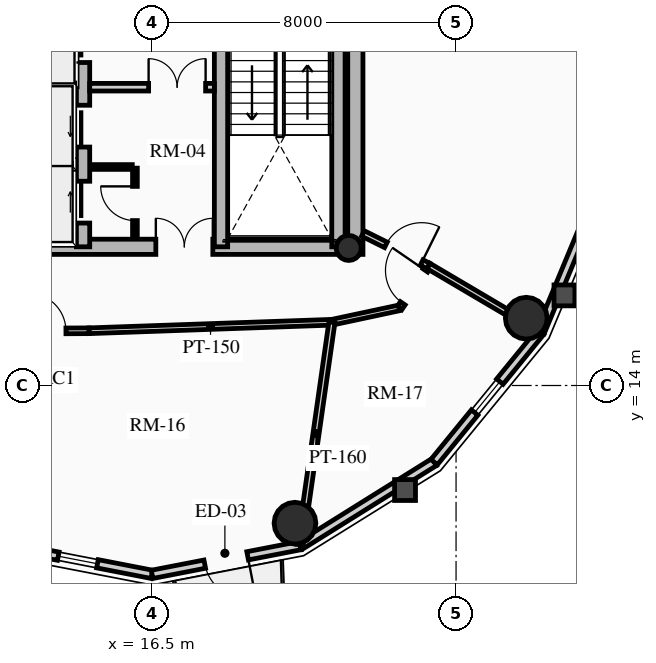
"""IFC4 building model, lengths in metres.
Left out: names, types, materials, properties, quantities, classifications, styles, units other than length and angle.
Written with IfcOpenShell. Run it as: python <this file> out.ifc"""

import sys

from ifc_helpers import new_model, si_unit, direction, frame, frame_2d, origin, origin_2d, place, context, subcontext, project, spatial, rectangle, circle, hollow_circle, extrude, source, transform, mapped, element, fill, save


model = new_model("IFC4")
c1 = context("Model", 3, precision=1e-05, world=origin(), true_north=direction((0.0, 1.0)))
c2 = subcontext(c1, "Body", "Model", "MODEL_VIEW")
j1 = project(units=[si_unit("LENGTHUNIT", "METRE"), si_unit("PLANEANGLEUNIT", "RADIAN")], contexts=[c1])
p1 = place(None, origin())
s1 = spatial("IfcSite", under=j1, at=p1, CompositionType="ELEMENT")
p2 = place(p1, origin())
s2 = spatial("IfcBuilding", under=s1, at=p2, CompositionType="ELEMENT")
p3 = place(p2, frame((0.0, 0.0, 217.03)))
s3 = spatial("IfcBuildingStorey", under=s2, at=p3, CompositionType="ELEMENT", Elevation=217.03)
p4 = place(p3, frame((21.85, 17.45, 0.0), z_axis=(0.0, 0.0, 1.0), x_axis=(0.0, 1.0, 0.0)))
e1 = element("IfcWall", 1, at=p4, inside=s3, PredefinedType="SHEAR", context=c2, shape_type="SweptSolid", body=[
    extrude(rectangle(XDim=14.1, YDim=0.4, at=frame_2d((7.05, 0.0))), origin(), (0.0, 0.0, 1.0), 2.91),
])
p5 = place(p3, frame((11.15, 17.65, 0.0), z_axis=(0.0, 0.0, 1.0), x_axis=(1.0, 0.0, 0.0)))
e2 = element("IfcWall", 2, at=p5, inside=s3, PredefinedType="SHEAR", context=c2, shape_type="SweptSolid", body=[
    extrude(rectangle(XDim=10.7, YDim=0.4, at=frame_2d((5.35, 0.0))), origin(), (0.0, 0.0, 1.0), 2.91),
])
m1 = source(origin(), c2, "Body", "SweptSolid", [
    extrude(rectangle(XDim=1.5, YDim=2.02, at=frame_2d((0.75, 1.01))), frame((0.0, 0.21, 0.0), z_axis=(0.0, -1.0, 0.0), x_axis=(1.0, 0.0, 0.0)), (0.0, 0.0, 1.0), 0.42),
])
p6 = place(p5, frame((5.45, 0.0, 0.0)))
e3 = element("IfcOpeningElement", 3, at=p6, cuts=e2, PredefinedType="OPENING", context=c2, shape_type="MappedRepresentation", body=[
    mapped(m1, transform((0.0, 0.0, 0.0), x_axis=(1.0, 0.0, 0.0), y_axis=(0.0, 1.0, 0.0), z_axis=(0.0, 0.0, 1.0), scale=1.0)),
])
p7 = place(p3, frame((14.685, 17.65, 0.0), z_axis=(0.0, 0.0, 1.0), x_axis=(0.0, 1.0, 0.0)))
e4 = element("IfcWall", 4, at=p7, inside=s3, PredefinedType="SHEAR", context=c2, shape_type="SweptSolid", body=[
    extrude(rectangle(XDim=13.7, YDim=0.35, at=frame_2d((6.85, 0.0))), origin(), (0.0, 0.0, 1.0), 2.91),
])
m2 = source(origin(), c2, "Body", "SweptSolid", [
    extrude(rectangle(XDim=1.1, YDim=2.015, at=frame_2d((0.55, 1.007))), frame((0.0, 0.185, 0.0), z_axis=(0.0, -1.0, 0.0), x_axis=(1.0, 0.0, 0.0)), (0.0, 0.0, 1.0), 0.37),
])
p8 = place(p7, frame((4.85, 0.0, 0.0)))
e5 = element("IfcOpeningElement", 5, at=p8, cuts=e4, PredefinedType="OPENING", context=c2, shape_type="MappedRepresentation", body=[
    mapped(m2, transform((0.0, 0.0, 0.0), x_axis=(1.0, 0.0, 0.0), y_axis=(0.0, 1.0, 0.0), z_axis=(0.0, 0.0, 1.0), scale=1.0)),
])
p9 = place(p7, frame((0.625, 0.0, 0.0)))
e6 = element("IfcOpeningElement", 6, at=p9, cuts=e4, PredefinedType="OPENING", context=c2, shape_type="MappedRepresentation", body=[
    mapped(m2, transform((0.0, 0.0, 0.0), x_axis=(1.0, 0.0, 0.0), y_axis=(0.0, 1.0, 0.0), z_axis=(0.0, 0.0, 1.0), scale=1.0)),
])
p10 = place(p7, frame((2.625, 0.0, 0.0)))
e7 = element("IfcOpeningElement", 7, at=p10, cuts=e4, PredefinedType="OPENING", context=c2, shape_type="MappedRepresentation", body=[
    mapped(m2, transform((0.0, 0.0, 0.0), x_axis=(1.0, 0.0, 0.0), y_axis=(0.0, 1.0, 0.0), z_axis=(0.0, 0.0, 1.0), scale=1.0)),
])
m3 = source(origin(), c2, "Body", "SweptSolid", [
    extrude(rectangle(XDim=1.15, YDim=2.02, at=frame_2d((0.575, 1.01))), frame((0.0, 0.185, 0.0), z_axis=(0.0, -1.0, 0.0), x_axis=(1.0, 0.0, 0.0)), (0.0, 0.0, 1.0), 0.37),
])
p11 = place(p7, frame((7.27, 0.0, 0.0)))
e8 = element("IfcOpeningElement", 8, at=p11, cuts=e4, PredefinedType="OPENING", context=c2, shape_type="MappedRepresentation", body=[
    mapped(m3, transform((0.0, 0.0, 0.0), x_axis=(1.0, 0.0, 0.0), y_axis=(0.0, 1.0, 0.0), z_axis=(0.0, 0.0, 1.0), scale=1.0)),
])
p12 = place(p3, frame((18.315, 17.65, 0.0), z_axis=(0.0, 0.0, 1.0), x_axis=(0.0, 1.0, 0.0)))
e9 = element("IfcWall", 9, at=p12, inside=s3, PredefinedType="SHEAR", context=c2, shape_type="SweptSolid", body=[
    extrude(rectangle(XDim=9.6, YDim=0.35, at=frame_2d((4.8, 0.0))), origin(), (0.0, 0.0, 1.0), 2.91),
])
p13 = place(p12, frame((5.28, 0.0, 0.0)))
e10 = element("IfcOpeningElement", 10, at=p13, cuts=e9, PredefinedType="OPENING", context=c2, shape_type="MappedRepresentation", body=[
    mapped(m3, transform((0.0, 0.0, 0.0), x_axis=(1.0, 0.0, 0.0), y_axis=(0.0, 1.0, 0.0), z_axis=(0.0, 0.0, 1.0), scale=1.0)),
])
p14 = place(p3, frame((21.405, 17.65, 0.0), z_axis=(0.0, 0.0, 1.0), x_axis=(0.0, 1.0, 0.0)))
e11 = element("IfcWall", 11, at=p14, inside=s3, PredefinedType="SHEAR", context=c2, shape_type="SweptSolid", body=[
    extrude(rectangle(XDim=6.695, YDim=0.35, at=frame_2d((3.348, 0.0))), origin(), (0.0, 0.0, 1.0), 2.91),
])
p15 = place(p3, frame((21.675, 17.62, 0.0), z_axis=(0.0, 0.0, 1.0), x_axis=(1.0, 0.0, 0.0)))
e12 = element("IfcColumn", 12, at=p15, inside=s3, PredefinedType="COLUMN", context=c2, shape_type="SweptSolid", body=[
    extrude(hollow_circle(Radius=0.33, WallThickness=0.025, at=origin_2d()), origin(), (0.0, 0.0, 1.0), 2.91),
])
for number, where, z_axis, x_axis in (
    (13, (20.261, 10.377, 0.0), (0.0, 0.0, 1.0), (1.0, 0.0, 0.0)),
    (14, (26.347, 15.771, 0.0), (0.0, 0.0, 1.0), (1.0, 0.0, 0.0)),
):
    element("IfcColumn", number, at=place(p3, frame(where, z_axis=z_axis, x_axis=x_axis)), inside=s3, PredefinedType="USERDEFINED", context=c2, shape_type="SweptSolid", body=[
        extrude(circle(Radius=0.55, at=origin_2d()), origin(), (0.0, 0.0, 1.0), 2.91),
    ])
p16 = place(p3, frame((16.5, 9.03, 0.0), z_axis=(0.0, 0.0, 1.0), x_axis=(-0.981700307484, 0.190432419211, 0.0)))
e15 = element("IfcWall", 15, at=p16, inside=s3, PredefinedType="SOLIDWALL", context=c2, shape_type="SweptSolid", body=[
    extrude(rectangle(XDim=3.976, YDim=0.22, at=frame_2d((1.988, 0.0))), origin(), (0.0, 0.0, 1.0), 2.322),
])
m4 = source(origin(), c2, "Body", "SweptSolid", [
    extrude(rectangle(XDim=1.05, YDim=1.3, at=frame_2d((0.525, 0.65))), frame((0.0, 0.12, 0.0), z_axis=(0.0, -1.0, 0.0), x_axis=(1.0, 0.0, 0.0)), (0.0, 0.0, 1.0), 0.24),
])
p17 = place(p16, frame((1.463, 0.0, 0.65)))
e16 = element("IfcOpeningElement", 16, at=p17, cuts=e15, PredefinedType="OPENING", context=c2, shape_type="MappedRepresentation", body=[
    mapped(m4, transform((0.0, 0.0, 0.0), x_axis=(1.0, 0.0, 0.0), y_axis=(0.0, 1.0, 0.0), z_axis=(0.0, 0.0, 1.0), scale=1.0)),
])
p18 = place(p3, frame((20.403, 9.787, 0.0), z_axis=(0.0, 0.0, 1.0), x_axis=(-0.981700307484, -0.190432419211, 0.0)))
e17 = element("IfcWall", 17, at=p18, inside=s3, PredefinedType="SOLIDWALL", context=c2, shape_type="SweptSolid", body=[
    extrude(rectangle(XDim=3.976, YDim=0.22, at=frame_2d((1.988, 0.0))), origin(), (0.0, 0.0, 1.0), 2.322),
])
m5 = source(origin(), c2, "Body", "SweptSolid", [
    extrude(rectangle(XDim=1.15, YDim=2.005, at=frame_2d((0.575, 1.002))), frame((0.0, 0.12, 0.0), z_axis=(0.0, -1.0, 0.0), x_axis=(1.0, 0.0, 0.0)), (0.0, 0.0, 1.0), 0.24),
])
p19 = place(p18, frame((1.413, 0.0, 0.0)))
e18 = element("IfcOpeningElement", 18, at=p19, cuts=e17, PredefinedType="OPENING", context=c2, shape_type="MappedRepresentation", body=[
    mapped(m5, transform((0.0, 0.0, 0.0), x_axis=(1.0, 0.0, 0.0), y_axis=(0.0, 1.0, 0.0), z_axis=(0.0, 0.0, 1.0), scale=1.0)),
])
p20 = place(p3, frame((23.924, 11.985, 0.0), z_axis=(0.0, 0.0, 1.0), x_axis=(-0.848318713376, -0.529485939886, 0.0)))
e19 = element("IfcWall", 19, at=p20, inside=s3, PredefinedType="SOLIDWALL", context=c2, shape_type="SweptSolid", body=[
    extrude(rectangle(XDim=4.15, YDim=0.22, at=frame_2d((2.075, 0.0))), origin(), (0.0, 0.0, 1.0), 2.322),
])
p21 = place(p3, frame((26.718, 15.407, 0.0), z_axis=(0.0, 0.0, 1.0), x_axis=(-0.632467166636, -0.774587169483, 0.0)))
e20 = element("IfcWall", 20, at=p21, inside=s3, PredefinedType="SOLIDWALL", context=c2, shape_type="SweptSolid", body=[
    extrude(rectangle(XDim=4.418, YDim=0.22, at=frame_2d((2.209, 0.0))), origin(), (0.0, 0.0, 1.0), 2.322),
])
p22 = place(p21, frame((1.684, 0.0, 0.65)))
e21 = element("IfcOpeningElement", 21, at=p22, cuts=e20, PredefinedType="OPENING", context=c2, shape_type="MappedRepresentation", body=[
    mapped(m4, transform((0.0, 0.0, 0.0), x_axis=(1.0, 0.0, 0.0), y_axis=(0.0, 1.0, 0.0), z_axis=(0.0, 0.0, 1.0), scale=1.0)),
])
p23 = place(p3, frame((28.512, 19.719, 0.0), z_axis=(0.0, 0.0, 1.0), x_axis=(-0.384036305194, -0.923317993052, 0.0)))
e22 = element("IfcWall", 22, at=p23, inside=s3, PredefinedType="SOLIDWALL", context=c2, shape_type="SweptSolid", body=[
    extrude(rectangle(XDim=4.671, YDim=0.22, at=frame_2d((2.335, 0.0))), origin(), (0.0, 0.0, 1.0), 2.322),
])
for number, where, z_axis, x_axis in (
    (23, (11.52, 21.8, 0.0), (0.0, 0.0, 1.0), (1.0, 0.0, 0.0)),
    (24, (11.52, 19.825, 0.0), (0.0, 0.0, 1.0), (1.0, 0.0, 0.0)),
):
    element("IfcWall", number, at=place(p3, frame(where, z_axis=z_axis, x_axis=x_axis)), inside=s3, PredefinedType="SHEAR", context=c2, shape_type="SweptSolid", body=[
        extrude(rectangle(XDim=2.97, YDim=0.2, at=frame_2d((1.485, 0.0))), origin(), (0.0, 0.0, 1.0), 2.91),
    ])
p24 = place(p3, frame((14.86, 21.85, 0.0), z_axis=(0.0, 0.0, 1.0), x_axis=(1.0, 0.0, 0.0)))
e25 = element("IfcWall", 25, at=p24, inside=s3, PredefinedType="PARTITIONING", context=c2, shape_type="SweptSolid", body=[
    extrude(rectangle(XDim=3.28, YDim=0.2, at=frame_2d((1.64, 0.0))), origin(), (0.0, 0.0, 1.0), 2.685),
])
m6 = source(origin(), c2, "Body", "SweptSolid", [
    extrude(rectangle(XDim=1.5, YDim=2.02, at=frame_2d((0.75, 1.01))), frame((0.0, 0.11, 0.0), z_axis=(0.0, -1.0, 0.0), x_axis=(1.0, 0.0, 0.0)), (0.0, 0.0, 1.0), 0.22),
])
p25 = place(p24, frame((1.55, 0.0, 0.0)))
e26 = element("IfcOpeningElement", 26, at=p25, cuts=e25, PredefinedType="OPENING", context=c2, shape_type="MappedRepresentation", body=[
    mapped(m6, transform((0.0, 0.0, 0.0), x_axis=(1.0, 0.0, 0.0), y_axis=(0.0, 1.0, 0.0), z_axis=(0.0, 0.0, 1.0), scale=1.0)),
])
p26 = place(p3, frame((16.05, 17.92, 0.0), z_axis=(0.0, 0.0, 1.0), x_axis=(0.0, 1.0, 0.0)))
e27 = element("IfcWall", 27, at=p26, inside=s3, PredefinedType="PARTITIONING", context=c2, shape_type="SweptSolid", body=[
    extrude(rectangle(XDim=1.8, YDim=0.125, at=frame_2d((0.9, 0.0))), origin(), (0.0, 0.0, 1.0), 2.685),
])
m7 = source(origin(), c2, "Body", "SweptSolid", [
    extrude(rectangle(XDim=0.9, YDim=2.005, at=frame_2d((0.45, 1.002))), frame((0.0, 0.073, 0.0), z_axis=(0.0, -1.0, 0.0), x_axis=(1.0, 0.0, 0.0)), (0.0, 0.0, 1.0), 0.145),
])
p27 = place(p26, frame((0.42, 0.0, 0.0)))
e28 = element("IfcOpeningElement", 28, at=p27, cuts=e27, PredefinedType="OPENING", context=c2, shape_type="MappedRepresentation", body=[
    mapped(m7, transform((0.0, 0.0, 0.0), x_axis=(1.0, 0.0, 0.0), y_axis=(0.0, 1.0, 0.0), z_axis=(0.0, 0.0, 1.0), scale=1.0)),
])
p28 = place(p3, frame((14.88, 19.75, 0.0), z_axis=(0.0, 0.0, 1.0), x_axis=(1.0, 0.0, 0.0)))
e29 = element("IfcWall", 29, at=p28, inside=s3, PredefinedType="PARTITIONING", context=c2, shape_type="SweptSolid", body=[
    extrude(rectangle(XDim=1.1, YDim=0.125, at=frame_2d((0.55, 0.0))), origin(), (0.0, 0.0, 1.0), 2.685),
])
p29 = place(p3, frame((11.644, 15.424, 0.0), z_axis=(0.0, 0.0, 1.0), x_axis=(0.999986552511, 0.005186019339, 0.0)))
e30 = element("IfcWall", 30, at=p29, inside=s3, PredefinedType="PARTITIONING", context=c2, shape_type="SweptSolid", body=[
    extrude(rectangle(XDim=3.201, YDim=0.15, at=frame_2d((1.601, 0.0))), origin(), (0.0, 0.0, 1.0), 2.322),
])
m8 = source(origin(), c2, "Body", "SweptSolid", [
    extrude(rectangle(XDim=1.0, YDim=2.015, at=frame_2d((0.5, 1.007))), frame((0.0, 0.085, 0.0), z_axis=(0.0, -1.0, 0.0), x_axis=(1.0, 0.0, 0.0)), (0.0, 0.0, 1.0), 0.17),
])
p30 = place(p29, frame((1.591, 0.0, 0.0)))
e31 = element("IfcOpeningElement", 31, at=p30, cuts=e30, PredefinedType="OPENING", context=c2, shape_type="MappedRepresentation", body=[
    mapped(m8, transform((0.0, 0.0, 0.0), x_axis=(1.0, 0.0, 0.0), y_axis=(0.0, 1.0, 0.0), z_axis=(0.0, 0.0, 1.0), scale=1.0)),
])
p31 = place(p3, frame((14.845, 15.441, 0.0), z_axis=(0.0, 0.0, 1.0), x_axis=(0.99938794868, 0.034981824334, 0.0)))
e32 = element("IfcWall", 32, at=p31, inside=s3, PredefinedType="PARTITIONING", context=c2, shape_type="SweptSolid", body=[
    extrude(rectangle(XDim=6.393, YDim=0.15, at=frame_2d((3.196, 0.0))), origin(), (0.0, 0.0, 1.0), 2.255),
])
p32 = place(p3, frame((21.234, 15.664, 0.0), z_axis=(0.0, 0.0, 1.0), x_axis=(0.977931581182, 0.208925399431, 0.0)))
e33 = element("IfcWall", 33, at=p32, inside=s3, PredefinedType="PARTITIONING", context=c2, shape_type="SweptSolid", body=[
    extrude(rectangle(XDim=1.823, YDim=0.15, at=frame_2d((0.912, 0.0))), origin(), (0.0, 0.0, 1.0), 2.255),
])
p33 = place(p3, frame((23.017, 16.045, 0.0), z_axis=(0.0, 0.0, 1.0), x_axis=(0.566660656138, 0.823951273308, 0.0)))
e34 = element("IfcWall", 34, at=p33, inside=s3, PredefinedType="PARTITIONING", context=c2, shape_type="SweptSolid", body=[
    extrude(rectangle(XDim=1.336, YDim=0.15, at=frame_2d((0.668, 0.0))), origin(), (0.0, 0.0, 1.0), 2.322),
])
m9 = source(origin(), c2, "Body", "SweptSolid", [
    extrude(rectangle(XDim=1.05, YDim=2.015, at=frame_2d((0.525, 1.007))), frame((0.0, 0.085, 0.0), z_axis=(0.0, -1.0, 0.0), x_axis=(1.0, 0.0, 0.0)), (0.0, 0.0, 1.0), 0.17),
])
p34 = place(p33, frame((0.143, 0.0, 0.0)))
e35 = element("IfcOpeningElement", 35, at=p34, cuts=e34, PredefinedType="OPENING", context=c2, shape_type="MappedRepresentation", body=[
    mapped(m9, transform((0.0, 0.0, 0.0), x_axis=(1.0, 0.0, 0.0), y_axis=(0.0, 1.0, 0.0), z_axis=(0.0, 0.0, 1.0), scale=1.0)),
])
p35 = place(p3, frame((21.234, 15.664, 0.0), z_axis=(0.0, 0.0, 1.0), x_axis=(-0.141467563045, -0.989942891588, 0.0)))
e36 = element("IfcWall", 36, at=p35, inside=s3, PredefinedType="PARTITIONING", context=c2, shape_type="SweptSolid", body=[
    extrude(rectangle(XDim=5.918, YDim=0.16, at=frame_2d((2.959, 0.0))), origin(), (0.0, 0.0, 1.0), 2.322),
])
p36 = place(p3, frame((23.774, 17.146, 0.0), z_axis=(0.0, 0.0, 1.0), x_axis=(0.861296601099, -0.508102514198, 0.0)))
e37 = element("IfcWall", 37, at=p36, inside=s3, PredefinedType="PARTITIONING", context=c2, shape_type="SweptSolid", body=[
    extrude(rectangle(XDim=3.399, YDim=0.16, at=frame_2d((1.7, 0.0))), origin(), (0.0, 0.0, 1.0), 2.322),
])
p37 = place(p3, frame((22.05, 18.0, 0.0), z_axis=(0.0, 0.0, 1.0), x_axis=(0.896045848613, -0.443961526692, 0.0)))
e38 = element("IfcWall", 38, at=p37, inside=s3, PredefinedType="PARTITIONING", context=c2, shape_type="SweptSolid", body=[
    extrude(rectangle(XDim=1.924, YDim=0.16, at=frame_2d((0.962, 0.0))), origin(), (0.0, 0.0, 1.0), 2.255),
])
m10 = source(origin(), c2, "Body", "SweptSolid", [
    extrude(rectangle(XDim=1.05, YDim=2.015, at=frame_2d((0.525, 1.007))), frame((0.0, 0.09, 0.0), z_axis=(0.0, -1.0, 0.0), x_axis=(1.0, 0.0, 0.0)), (0.0, 0.0, 1.0), 0.18),
])
p38 = place(p37, frame((0.674, 0.0, 0.0)))
e39 = element("IfcOpeningElement", 39, at=p38, cuts=e38, PredefinedType="OPENING", context=c2, shape_type="MappedRepresentation", body=[
    mapped(m10, transform((0.0, 0.0, 0.0), x_axis=(1.0, 0.0, 0.0), y_axis=(0.0, 1.0, 0.0), z_axis=(0.0, 0.0, 1.0), scale=1.0)),
])
m11 = source(origin(), c2, "Body", "SweptSolid", [
    extrude(rectangle(XDim=1.05, YDim=1.3, at=frame_2d((0.525, 0.65))), frame((0.0, 0.03, 0.0), z_axis=(0.0, -1.0, 0.0), x_axis=(1.0, 0.0, 0.0)), (0.0, 0.0, 1.0), 0.06),
])
p39 = place(p17, origin())
e40 = element("IfcWindow", 40, at=p39, inside=s3, PartitioningType="SINGLE_PANEL", PredefinedType="WINDOW", context=c2, shape_type="MappedRepresentation", body=[
    mapped(m11, transform((0.0, 0.0, 0.0), x_axis=(1.0, 0.0, 0.0), y_axis=(0.0, 1.0, 0.0), z_axis=(0.0, 0.0, 1.0), scale=1.0)),
])
fill(e16, e40)
m12 = source(origin(), c2, "Body", "SweptSolid", [
    extrude(rectangle(XDim=1.15, YDim=2.005, at=frame_2d((0.575, 1.002))), frame((0.0, 0.025, 0.0), z_axis=(0.0, -1.0, 0.0), x_axis=(1.0, 0.0, 0.0)), (0.0, 0.0, 1.0), 0.05),
])
p40 = place(p19, origin())
e41 = element("IfcDoor", 41, at=p40, inside=s3, OperationType="SINGLE_SWING_LEFT", PredefinedType="DOOR", context=c2, shape_type="MappedRepresentation", body=[
    mapped(m12, transform((0.0, 0.0, 0.0), x_axis=(1.0, 0.0, 0.0), y_axis=(0.0, 1.0, 0.0), z_axis=(0.0, 0.0, 1.0), scale=1.0)),
])
fill(e18, e41)
p41 = place(p22, origin())
e42 = element("IfcWindow", 42, at=p41, inside=s3, PartitioningType="SINGLE_PANEL", PredefinedType="WINDOW", context=c2, shape_type="MappedRepresentation", body=[
    mapped(m11, transform((0.0, 0.0, 0.0), x_axis=(1.0, 0.0, 0.0), y_axis=(0.0, 1.0, 0.0), z_axis=(0.0, 0.0, 1.0), scale=1.0)),
])
fill(e21, e42)
m13 = source(origin(), c2, "Body", "SweptSolid", [
    extrude(rectangle(XDim=1.1, YDim=2.015, at=frame_2d((0.55, 1.007))), frame((0.0, 0.025, 0.0), z_axis=(0.0, -1.0, 0.0), x_axis=(1.0, 0.0, 0.0)), (0.0, 0.0, 1.0), 0.05),
])
p42 = place(p8, origin())
e43 = element("IfcDoor", 43, at=p42, inside=s3, OperationType="SLIDING_TO_RIGHT", PredefinedType="DOOR", context=c2, shape_type="MappedRepresentation", body=[
    mapped(m13, transform((0.0, 0.0, 0.0), x_axis=(1.0, 0.0, 0.0), y_axis=(0.0, 1.0, 0.0), z_axis=(0.0, 0.0, 1.0), scale=1.0)),
])
fill(e5, e43)
p43 = place(p9, origin())
e44 = element("IfcDoor", 44, at=p43, inside=s3, OperationType="SLIDING_TO_RIGHT", PredefinedType="DOOR", context=c2, shape_type="MappedRepresentation", body=[
    mapped(m13, transform((0.0, 0.0, 0.0), x_axis=(1.0, 0.0, 0.0), y_axis=(0.0, 1.0, 0.0), z_axis=(0.0, 0.0, 1.0), scale=1.0)),
])
fill(e6, e44)
p44 = place(p10, origin())
e45 = element("IfcDoor", 45, at=p44, inside=s3, OperationType="SLIDING_TO_LEFT", PredefinedType="DOOR", context=c2, shape_type="MappedRepresentation", body=[
    mapped(m13, transform((0.0, 0.0, 0.0), x_axis=(1.0, 0.0, 0.0), y_axis=(0.0, 1.0, 0.0), z_axis=(0.0, 0.0, 1.0), scale=1.0)),
])
fill(e7, e45)
m14 = source(origin(), c2, "Body", "SweptSolid", [
    extrude(rectangle(XDim=1.5, YDim=2.02, at=frame_2d((0.75, 1.01))), frame((0.0, 0.025, 0.0), z_axis=(0.0, -1.0, 0.0), x_axis=(1.0, 0.0, 0.0)), (0.0, 0.0, 1.0), 0.05),
])
p45 = place(p6, origin())
e46 = element("IfcDoor", 46, at=p45, inside=s3, OperationType="DOUBLE_DOOR_SINGLE_SWING", PredefinedType="DOOR", context=c2, shape_type="MappedRepresentation", body=[
    mapped(m14, transform((0.0, 0.0, 0.0), x_axis=(1.0, 0.0, 0.0), y_axis=(0.0, 1.0, 0.0), z_axis=(0.0, 0.0, 1.0), scale=1.0)),
])
fill(e3, e46)
p46 = place(p25, origin())
e47 = element("IfcDoor", 47, at=p46, inside=s3, OperationType="DOUBLE_DOOR_SINGLE_SWING", PredefinedType="DOOR", context=c2, shape_type="MappedRepresentation", body=[
    mapped(m14, transform((0.0, 0.0, 0.0), x_axis=(1.0, 0.0, 0.0), y_axis=(0.0, 1.0, 0.0), z_axis=(0.0, 0.0, 1.0), scale=1.0)),
])
fill(e26, e47)
m15 = source(origin(), c2, "Body", "SweptSolid", [
    extrude(rectangle(XDim=0.9, YDim=2.005, at=frame_2d((0.45, 1.002))), frame((0.0, 0.025, 0.0), z_axis=(0.0, -1.0, 0.0), x_axis=(1.0, 0.0, 0.0)), (0.0, 0.0, 1.0), 0.05),
])
p47 = place(p27, origin())
e48 = element("IfcDoor", 48, at=p47, inside=s3, OperationType="SINGLE_SWING_RIGHT", PredefinedType="DOOR", context=c2, shape_type="MappedRepresentation", body=[
    mapped(m15, transform((0.0, 0.0, 0.0), x_axis=(1.0, 0.0, 0.0), y_axis=(0.0, 1.0, 0.0), z_axis=(0.0, 0.0, 1.0), scale=1.0)),
])
fill(e28, e48)
m16 = source(origin(), c2, "Body", "SweptSolid", [
    extrude(rectangle(XDim=1.05, YDim=2.015, at=frame_2d((0.525, 1.007))), frame((0.0, 0.025, 0.0), z_axis=(0.0, -1.0, 0.0), x_axis=(1.0, 0.0, 0.0)), (0.0, 0.0, 1.0), 0.05),
])
p48 = place(p38, origin())
e49 = element("IfcDoor", 49, at=p48, inside=s3, OperationType="SINGLE_SWING_RIGHT", PredefinedType="DOOR", context=c2, shape_type="MappedRepresentation", body=[
    mapped(m16, transform((0.0, 0.0, 0.0), x_axis=(1.0, 0.0, 0.0), y_axis=(0.0, 1.0, 0.0), z_axis=(0.0, 0.0, 1.0), scale=1.0)),
])
fill(e39, e49)
m17 = source(origin(), c2, "Body", "SweptSolid", [
    extrude(rectangle(XDim=1.0, YDim=2.015, at=frame_2d((0.5, 1.007))), frame((0.0, 0.025, 0.0), z_axis=(0.0, -1.0, 0.0), x_axis=(1.0, 0.0, 0.0)), (0.0, 0.0, 1.0), 0.05),
])
p49 = place(p30, origin())
e50 = element("IfcDoor", 50, at=p49, inside=s3, OperationType="SINGLE_SWING_LEFT", PredefinedType="DOOR", context=c2, shape_type="MappedRepresentation", body=[
    mapped(m17, transform((0.0, 0.0, 0.0), x_axis=(1.0, 0.0, 0.0), y_axis=(0.0, 1.0, 0.0), z_axis=(0.0, 0.0, 1.0), scale=1.0)),
])
fill(e31, e50)
p50 = place(p34, origin())
e51 = element("IfcDoor", 51, at=p50, inside=s3, OperationType="SINGLE_SWING_RIGHT", PredefinedType="DOOR", context=c2, shape_type="MappedRepresentation", body=[
    mapped(m16, transform((0.0, 0.0, 0.0), x_axis=(1.0, 0.0, 0.0), y_axis=(0.0, 1.0, 0.0), z_axis=(0.0, 0.0, 1.0), scale=1.0)),
])
fill(e35, e51)
save(model, sys.argv[1])
